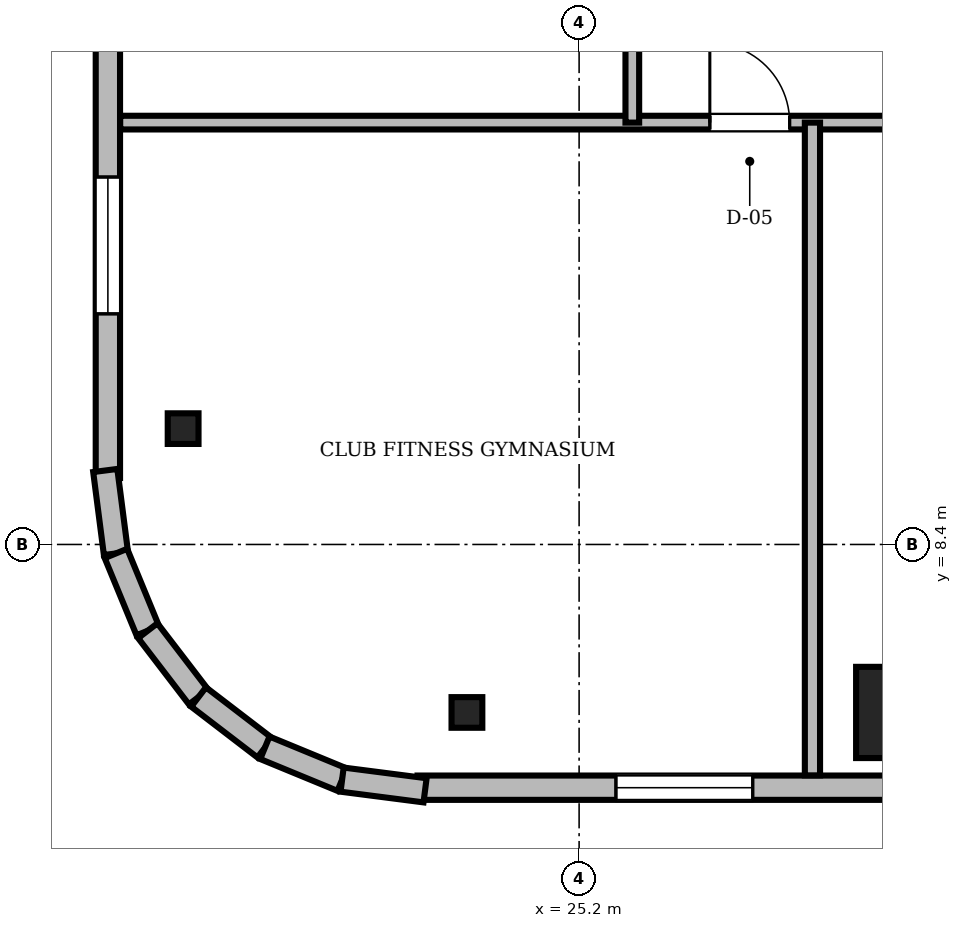
"""IFC4 building model, lengths in metres.
Left out: names, types, materials, properties, quantities, classifications, styles, units other than length and angle.
Written with IfcOpenShell. Run it as: python <this file> out.ifc"""

import sys

from ifc_helpers import new_model, si_unit, direction, frame, frame_2d, origin, origin_2d, place, context, subcontext, project, spatial, rectangle, i_section, extrude, source, transform, mapped, element, fill, save


model = new_model("IFC4")
c1 = context("Model", 3, precision=1e-05, world=origin(), true_north=direction((0.0, 1.0)))
c2 = subcontext(c1, "Body", "Model", "MODEL_VIEW")
j1 = project(units=[si_unit("LENGTHUNIT", "METRE"), si_unit("PLANEANGLEUNIT", "RADIAN")], contexts=[c1])
p1 = place(None, origin())
s1 = spatial("IfcSite", under=j1, at=p1, CompositionType="ELEMENT")
p2 = place(p1, origin())
s2 = spatial("IfcBuilding", under=s1, at=p2, CompositionType="ELEMENT")
p3 = place(p2, frame((0.0, 0.0, 278.25)))
s3 = spatial("IfcBuildingStorey", under=s2, at=p3, CompositionType="ELEMENT", Elevation=278.25)
m1 = source(origin(), c2, "Body", "SweptSolid", [
    extrude(rectangle(XDim=1.2, YDim=1.2, at=origin_2d()), origin(), (0.0, 0.0, 1.0), 3.354),
])
for number, where, z_axis, x_axis in (
    (1, (29.444, 6.19, 0.0), (0.076, 0.161, 0.984), (-0.904, 0.428, 0.0)),
    (2, (19.99, 15.644, 0.0), (0.161, 0.076, 0.984), (-0.428, 0.904, 0.0)),
):
    element("IfcColumn", number, at=place(p3, frame(where, z_axis=z_axis, x_axis=x_axis)), inside=s3, PredefinedType="COLUMN", context=c2, shape_type="MappedRepresentation", body=[
        mapped(m1, transform((0.0, 0.0, 0.0), scale=1.0)),
    ])
m2 = source(origin(), c2, "Body", "SweptSolid", [
    extrude(i_section(OverallWidth=0.405, OverallDepth=0.403, WebThickness=0.018, FlangeThickness=0.028, FilletRadius=0.015, at=origin_2d()), origin(), (0.0, 0.0, 1.0), 3.371),
])
p4 = place(p3, frame((23.724, 6.19, 0.0), z_axis=(0.126309254806, 0.160204169513, 0.97896914978), x_axis=(-0.785282442908, 0.619137694589, 0.0)))
e3 = element("IfcColumn", 3, at=p4, inside=s3, PredefinedType="COLUMN", context=c2, shape_type="MappedRepresentation", body=[
    mapped(m2, transform((0.0, 0.0, 0.0), scale=1.0)),
])
m3 = source(origin(), c2, "Body", "SweptSolid", [
    extrude(i_section(OverallWidth=0.405, OverallDepth=0.403, WebThickness=0.018, FlangeThickness=0.028, FilletRadius=0.015, at=origin_2d()), origin(), (0.0, 0.0, 1.0), 3.371),
])
p5 = place(p3, frame((19.99, 9.924, 0.0), z_axis=(0.160202703573, 0.126380523389, 0.978960191773), x_axis=(-0.619356546002, 0.785109845133, 0.0)))
e4 = element("IfcColumn", 4, at=p5, inside=s3, PredefinedType="COLUMN", context=c2, shape_type="MappedRepresentation", body=[
    mapped(m3, transform((0.0, 0.0, 0.0), scale=1.0)),
])
m4 = source(origin(), c2, "Body", "SweptSolid", [
    extrude(rectangle(XDim=12.626, YDim=0.32, at=frame_2d((6.313, 0.0))), origin(), (0.0, 0.0, 1.0), 3.3),
])
p6 = place(p3, frame((23.074, 5.2, 0.0), z_axis=(0.0, 0.0, 1.0), x_axis=(1.0, 0.0, 0.0)))
e5 = element("IfcWall", 5, at=p6, inside=s3, PredefinedType="SOLIDWALL", context=c2, shape_type="MappedRepresentation", body=[
    mapped(m4, transform((0.0, 0.0, 0.0), scale=1.0)),
])
m5 = source(origin(), c2, "Body", "SweptSolid", [
    extrude(rectangle(XDim=1.8, YDim=2.4, at=frame_2d((0.9, 1.2))), frame((0.0, 0.17, 0.0), z_axis=(0.0, -1.0, 0.0), x_axis=(1.0, 0.0, 0.0)), (0.0, 0.0, 1.0), 0.34),
])
p7 = place(p6, frame((2.61, 0.0, 0.64)))
e6 = element("IfcOpeningElement", 6, at=p7, cuts=e5, PredefinedType="OPENING", context=c2, shape_type="MappedRepresentation", body=[
    mapped(m5, transform((0.0, 0.0, 0.0), scale=1.0)),
])
p8 = place(p3, frame((19.0, 21.9, 0.0), z_axis=(0.0, 0.0, 1.0), x_axis=(0.0, -1.0, 0.0)))
e7 = element("IfcWall", 7, at=p8, inside=s3, PredefinedType="SOLIDWALL", context=c2, shape_type="MappedRepresentation", body=[
    mapped(m4, transform((0.0, 0.0, 0.0), scale=1.0)),
])
m6 = source(origin(), c2, "Body", "SweptSolid", [
    extrude(rectangle(XDim=1.4, YDim=2.3, at=frame_2d((0.7, 1.15))), frame((0.0, 0.17, 0.0), z_axis=(0.0, -1.0, 0.0), x_axis=(1.0, 0.0, 0.0)), (0.0, 0.0, 1.0), 0.34),
])
p9 = place(p8, frame((3.448, 0.0, 0.0)))
e8 = element("IfcOpeningElement", 8, at=p9, cuts=e7, PredefinedType="OPENING", context=c2, shape_type="MappedRepresentation", body=[
    mapped(m6, transform((0.0, 0.0, 0.0), scale=1.0)),
])
p10 = place(p8, frame((8.666, 0.0, 0.64)))
e9 = element("IfcOpeningElement", 9, at=p10, cuts=e7, PredefinedType="OPENING", context=c2, shape_type="MappedRepresentation", body=[
    mapped(m5, transform((0.0, 0.0, 0.0), scale=1.0)),
])
m7 = source(origin(), c2, "Body", "SweptSolid", [
    extrude(rectangle(XDim=1.101, YDim=0.32, at=frame_2d((0.55, 0.0))), origin(), (0.0, 0.0, 1.0), 3.3),
])
p11 = place(p3, frame((18.966, 9.373, 0.0), z_axis=(0.0, 0.0, 1.0), x_axis=(0.127774253526, -0.991803276933, 0.0)))
e10 = element("IfcWall", 10, at=p11, inside=s3, PredefinedType="SOLIDWALL", context=c2, shape_type="MappedRepresentation", body=[
    mapped(m7, transform((0.0, 0.0, 0.0), scale=1.0)),
])
m8 = source(origin(), c2, "Body", "SweptSolid", [
    extrude(rectangle(XDim=1.099, YDim=0.32, at=frame_2d((0.55, 0.0))), origin(), (0.0, 0.0, 1.0), 3.3),
])
p12 = place(p3, frame((19.106, 8.282, 0.0), z_axis=(0.0, 0.0, 1.0), x_axis=(0.380906191676, -0.924613688598, 0.0)))
e11 = element("IfcWall", 11, at=p12, inside=s3, PredefinedType="SOLIDWALL", context=c2, shape_type="MappedRepresentation", body=[
    mapped(m8, transform((0.0, 0.0, 0.0), scale=1.0)),
])
m9 = source(origin(), c2, "Body", "SweptSolid", [
    extrude(rectangle(XDim=1.099, YDim=0.32, at=frame_2d((0.549, 0.0))), origin(), (0.0, 0.0, 1.0), 3.3),
])
for number, where, z_axis, x_axis in (
    (12, (19.525, 7.265, 0.0), (0.0, 0.0, 1.0), (0.608, -0.794, 0.0)),
    (13, (20.193, 6.393, 0.0), (0.0, 0.0, 1.0), (0.794, -0.608, 0.0)),
):
    element("IfcWall", number, at=place(p3, frame(where, z_axis=z_axis, x_axis=x_axis)), inside=s3, PredefinedType="SOLIDWALL", context=c2, shape_type="MappedRepresentation", body=[
        mapped(m9, transform((0.0, 0.0, 0.0), scale=1.0)),
    ])
p13 = place(p3, frame((21.065, 5.725, 0.0), z_axis=(0.0, 0.0, 1.0), x_axis=(0.924613688598, -0.380906191676, 0.0)))
e14 = element("IfcWall", 14, at=p13, inside=s3, PredefinedType="SOLIDWALL", context=c2, shape_type="MappedRepresentation", body=[
    mapped(m8, transform((0.0, 0.0, 0.0), scale=1.0)),
])
m10 = source(origin(), c2, "Body", "SweptSolid", [
    extrude(rectangle(XDim=1.1, YDim=0.32, at=frame_2d((0.55, 0.0))), origin(), (0.0, 0.0, 1.0), 3.3),
])
p14 = place(p3, frame((22.082, 5.306, 0.0), z_axis=(0.0, 0.0, 1.0), x_axis=(0.991799654079, -0.127802371532, 0.0)))
e15 = element("IfcWall", 15, at=p14, inside=s3, PredefinedType="SOLIDWALL", context=c2, shape_type="MappedRepresentation", body=[
    mapped(m10, transform((0.0, 0.0, 0.0), scale=1.0)),
])
m11 = source(origin(), c2, "Body", "SweptSolid", [
    extrude(rectangle(XDim=39.676, YDim=0.18, at=frame_2d((19.838, 0.0))), origin(), (0.0, 0.0, 1.0), 2.08),
])
p15 = place(p3, frame((19.162, 13.95, 0.0), z_axis=(0.0, 0.0, 1.0), x_axis=(1.0, 0.0, 0.0)))
e16 = element("IfcWall", 16, at=p15, inside=s3, PredefinedType="PARTITIONING", context=c2, shape_type="MappedRepresentation", body=[
    mapped(m11, transform((0.0, 0.0, 0.0), scale=1.0)),
])
m12 = source(origin(), c2, "Body", "SweptSolid", [
    extrude(rectangle(XDim=1.05, YDim=2.2, at=frame_2d((0.525, 1.1))), frame((0.0, 0.1, 0.0), z_axis=(0.0, -1.0, 0.0), x_axis=(1.0, 0.0, 0.0)), (0.0, 0.0, 1.0), 0.2),
])
p16 = place(p15, frame((7.758, 0.0, 0.0)))
e17 = element("IfcOpeningElement", 17, at=p16, cuts=e16, PredefinedType="OPENING", context=c2, shape_type="MappedRepresentation", body=[
    mapped(m12, transform((0.0, 0.0, 0.0), scale=1.0)),
])
p17 = place(p15, frame((11.846, 0.0, 0.0)))
e18 = element("IfcOpeningElement", 18, at=p17, cuts=e16, PredefinedType="OPENING", context=c2, shape_type="MappedRepresentation", body=[
    mapped(m12, transform((0.0, 0.0, 0.0), scale=1.0)),
])
p18 = place(p15, frame((18.363, 0.0, 0.0)))
e19 = element("IfcOpeningElement", 19, at=p18, cuts=e16, PredefinedType="OPENING", context=c2, shape_type="MappedRepresentation", body=[
    mapped(m12, transform((0.0, 0.0, 0.0), scale=1.0)),
])
p19 = place(p15, frame((24.88, 0.0, 0.0)))
e20 = element("IfcOpeningElement", 20, at=p19, cuts=e16, PredefinedType="OPENING", context=c2, shape_type="MappedRepresentation", body=[
    mapped(m12, transform((0.0, 0.0, 0.0), scale=1.0)),
])
p20 = place(p15, frame((29.758, 0.0, 0.0)))
e21 = element("IfcOpeningElement", 21, at=p20, cuts=e16, PredefinedType="OPENING", context=c2, shape_type="MappedRepresentation", body=[
    mapped(m12, transform((0.0, 0.0, 0.0), scale=1.0)),
])
m13 = source(origin(), c2, "Body", "SweptSolid", [
    extrude(rectangle(XDim=14.6, YDim=0.18, at=frame_2d((7.3, 0.0))), origin(), (0.0, 0.0, 1.0), 2.742),
])
p21 = place(p3, frame((25.9, 13.95, 0.0), z_axis=(0.0, 0.0, 1.0), x_axis=(0.0, 1.0, 0.0)))
e22 = element("IfcWall", 22, at=p21, inside=s3, PredefinedType="PARTITIONING", context=c2, shape_type="MappedRepresentation", body=[
    mapped(m13, transform((0.0, 0.0, 0.0), scale=1.0)),
])
p22 = place(p21, frame((1.981, 0.0, 0.0)))
e23 = element("IfcOpeningElement", 23, at=p22, cuts=e22, PredefinedType="OPENING", context=c2, shape_type="MappedRepresentation", body=[
    mapped(m12, transform((0.0, 0.0, 0.0), scale=1.0)),
])
m14 = source(origin(), c2, "Body", "SweptSolid", [
    extrude(rectangle(XDim=0.95, YDim=2.15, at=frame_2d((0.475, 1.075))), frame((0.0, 0.1, 0.0), z_axis=(0.0, -1.0, 0.0), x_axis=(1.0, 0.0, 0.0)), (0.0, 0.0, 1.0), 0.2),
])
p23 = place(p21, frame((7.93, 0.0, 0.0)))
e24 = element("IfcOpeningElement", 24, at=p23, cuts=e22, PredefinedType="OPENING", context=c2, shape_type="MappedRepresentation", body=[
    mapped(m14, transform((0.0, 0.0, 0.0), scale=1.0)),
])
p24 = place(p21, frame((12.747, 0.0, 0.0)))
e25 = element("IfcOpeningElement", 25, at=p24, cuts=e22, PredefinedType="OPENING", context=c2, shape_type="MappedRepresentation", body=[
    mapped(m14, transform((0.0, 0.0, 0.0), scale=1.0)),
])
m15 = source(origin(), c2, "Body", "SweptSolid", [
    extrude(rectangle(XDim=8.588, YDim=0.2, at=frame_2d((4.294, 0.0))), origin(), (0.0, 0.0, 1.0), 2.08),
])
p25 = place(p3, frame((28.27, 5.362, 0.0), z_axis=(0.0, 0.0, 1.0), x_axis=(0.0, 1.0, 0.0)))
e26 = element("IfcWall", 26, at=p25, inside=s3, PredefinedType="PARTITIONING", context=c2, shape_type="MappedRepresentation", body=[
    mapped(m15, transform((0.0, 0.0, 0.0), scale=1.0)),
])
m16 = source(origin(), c2, "Body", "SweptSolid", [
    extrude(rectangle(XDim=1.8, YDim=2.4, at=frame_2d((0.9, 1.2))), frame((0.0, 0.03, 0.0), z_axis=(0.0, -1.0, 0.0), x_axis=(1.0, 0.0, 0.0)), (0.0, 0.0, 1.0), 0.06),
])
p26 = place(p7, origin())
e27 = element("IfcWindow", 27, at=p26, inside=s3, PartitioningType="SINGLE_PANEL", PredefinedType="WINDOW", context=c2, shape_type="MappedRepresentation", body=[
    mapped(m16, transform((0.0, 0.0, 0.0), scale=1.0)),
])
fill(e6, e27)
p27 = place(p10, origin())
e28 = element("IfcWindow", 28, at=p27, inside=s3, PartitioningType="SINGLE_PANEL", PredefinedType="WINDOW", context=c2, shape_type="MappedRepresentation", body=[
    mapped(m16, transform((0.0, 0.0, 0.0), scale=1.0)),
])
fill(e9, e28)
m17 = source(origin(), c2, "Body", "SweptSolid", [
    extrude(rectangle(XDim=1.05, YDim=2.2, at=frame_2d((0.525, 1.1))), frame((0.0, 0.025, 0.0), z_axis=(0.0, -1.0, 0.0), x_axis=(1.0, 0.0, 0.0)), (0.0, 0.0, 1.0), 0.05),
])
p28 = place(p16, origin())
e29 = element("IfcDoor", 29, at=p28, inside=s3, OperationType="SINGLE_SWING_LEFT", PredefinedType="DOOR", context=c2, shape_type="MappedRepresentation", body=[
    mapped(m17, transform((0.0, 0.0, 0.0), scale=1.0)),
])
fill(e17, e29)
save(model, sys.argv[1])
